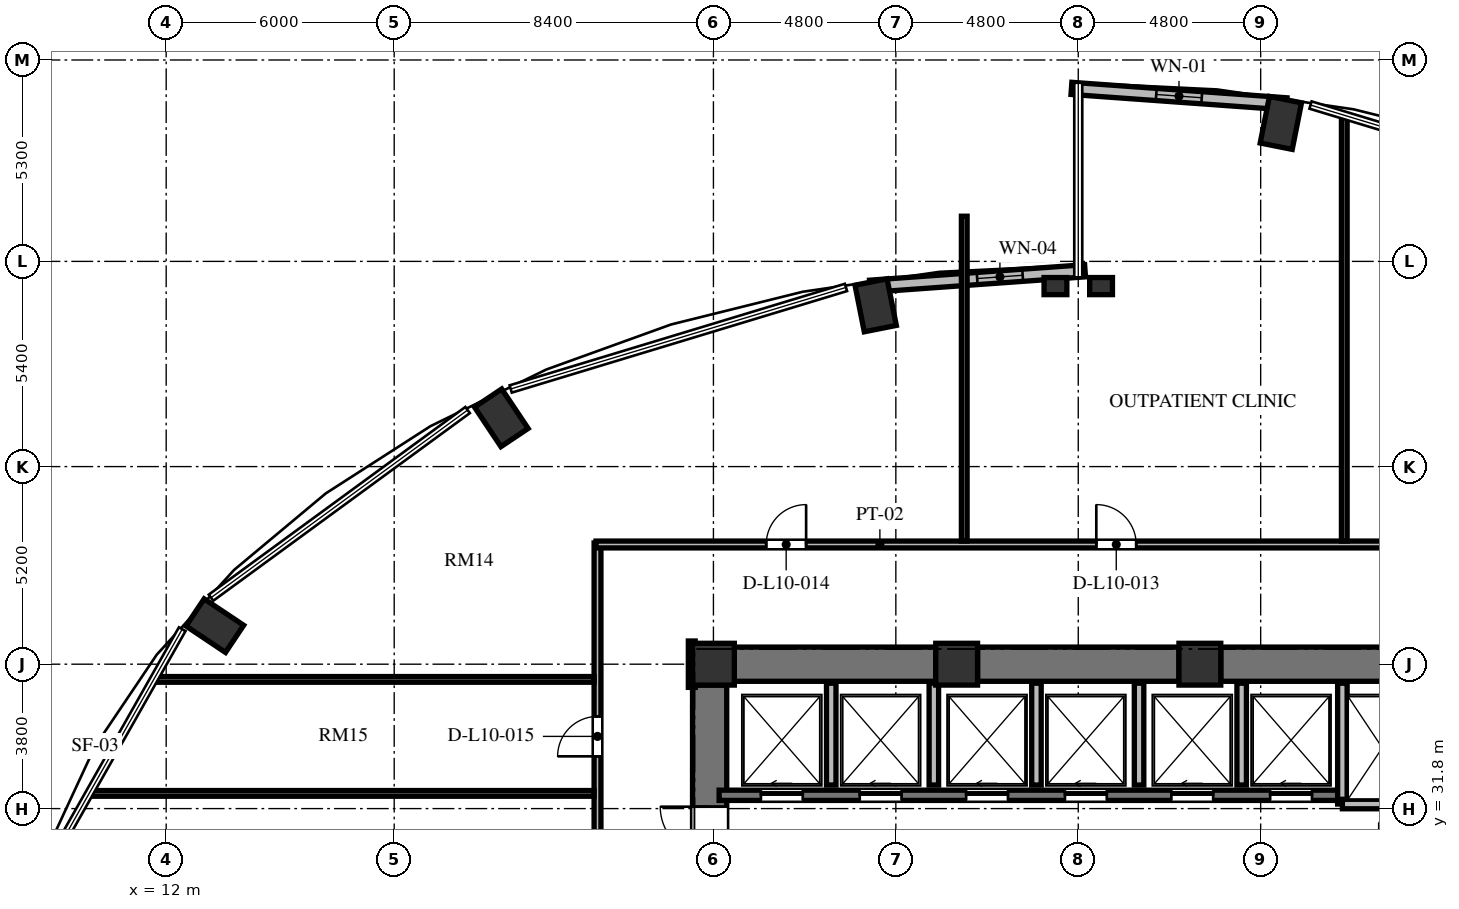
"""IFC4 building model, lengths in metres.
Left out: names, types, materials, properties, quantities, classifications, styles, units other than length and angle.
Written with IfcOpenShell. Run it as: python <this file> out.ifc"""

import sys

from ifc_helpers import new_model, si_unit, direction, frame, frame_2d, origin, origin_2d, place, context, subcontext, project, spatial, rectangle, extrude, element, fill, save


model = new_model("IFC4")
c1 = context("Model", 3, precision=1e-05, world=origin(), true_north=direction((0.0, 1.0)))
c2 = subcontext(c1, "Body", "Model", "MODEL_VIEW")
j1 = project(units=[si_unit("LENGTHUNIT", "METRE"), si_unit("PLANEANGLEUNIT", "RADIAN")], contexts=[c1])
p1 = place(None, origin())
s1 = spatial("IfcSite", under=j1, at=p1, CompositionType="ELEMENT")
p2 = place(p1, origin())
s2 = spatial("IfcBuilding", under=s1, at=p2, CompositionType="ELEMENT")
p3 = place(p2, frame((0.0, 0.0, 43.44)))
s3 = spatial("IfcBuildingStorey", under=s2, at=p3, CompositionType="ELEMENT", Elevation=43.44)
for number, where, z_axis, x_axis in (
    (1, (41.331, 49.844, 0.0), (0.0, 0.0, 1.0), (0.195, 0.981, 0.0)),
    (2, (30.669, 45.044, 0.0), (0.0, 0.0, 1.0), (-0.195, 0.981, 0.0)),
    (3, (20.819, 42.084, 0.0), (0.0, 0.0, 1.0), (-0.556, 0.831, 0.0)),
    (4, (13.28, 36.614, 0.0), (0.0, 0.0, 1.0), (-0.831, 0.556, 0.0)),
):
    element("IfcColumn", number, at=place(p3, frame(where, z_axis=z_axis, x_axis=x_axis)), inside=s3, PredefinedType="COLUMN", context=c2, shape_type="SweptSolid", body=[
        extrude(rectangle(XDim=1.25, YDim=0.86, at=origin_2d()), origin(), (0.0, 0.0, 1.0), 3.648),
    ])
for number, where, z_axis, x_axis in (
    (5, (39.2, 35.6, 0.0), (0.0, 0.0, 1.0), (1.0, 0.0, 0.0)),
    (6, (32.8, 35.6, 0.0), (0.0, 0.0, 1.0), (1.0, 0.0, 0.0)),
    (7, (26.4, 35.6, 0.0), (0.0, 0.0, 1.0), (1.0, 0.0, 0.0)),
):
    element("IfcColumn", number, at=place(p3, frame(where, z_axis=z_axis, x_axis=x_axis)), inside=s3, PredefinedType="COLUMN", context=c2, shape_type="SweptSolid", body=[
        extrude(rectangle(XDim=1.1, YDim=1.1, at=origin_2d()), origin(), (0.0, 0.0, 1.0), 3.648),
    ])
for number, where, z_axis, x_axis in (
    (8, (35.4, 45.55, 0.0), (0.0, 0.0, 1.0), (1.0, 0.0, 0.0)),
    (9, (36.6, 45.55, 0.0), (0.0, 0.0, 1.0), (1.0, 0.0, 0.0)),
):
    element("IfcColumn", number, at=place(p3, frame(where, z_axis=z_axis, x_axis=x_axis)), inside=s3, PredefinedType="PILASTER", context=c2, shape_type="SweptSolid", body=[
        extrude(rectangle(XDim=0.6, YDim=0.45, at=origin_2d()), origin(), (0.0, 0.0, 1.0), 3.648),
    ])
p4 = place(p3, frame((26.3, 20.95, 0.0), z_axis=(0.0, 0.0, 1.0), x_axis=(0.0, 1.0, 0.0)))
e10 = element("IfcWall", 10, at=p4, inside=s3, PredefinedType="SHEAR", context=c2, shape_type="SweptSolid", body=[
    extrude(rectangle(XDim=14.1, YDim=0.9, at=frame_2d((7.05, 0.0))), origin(), (0.0, 0.0, 1.0), 3.648),
])
p5 = place(p4, frame((6.5, 0.0, 0.0)))
e11 = element("IfcOpeningElement", 11, at=p5, cuts=e10, PredefinedType="OPENING", context=c2, shape_type="SweptSolid", body=[
    extrude(rectangle(XDim=1.2, YDim=2.15, at=frame_2d((0.6, 1.075))), frame((0.0, 0.46, 0.0), z_axis=(0.0, -1.0, 0.0), x_axis=(1.0, 0.0, 0.0)), (0.0, 0.0, 1.0), 0.92),
])
p6 = place(p4, frame((9.6, 0.0, 0.0)))
e12 = element("IfcOpeningElement", 12, at=p6, cuts=e10, PredefinedType="OPENING", context=c2, shape_type="SweptSolid", body=[
    extrude(rectangle(XDim=1.3, YDim=2.2, at=frame_2d((0.65, 1.1))), frame((0.0, 0.46, 0.0), z_axis=(0.0, -1.0, 0.0), x_axis=(1.0, 0.0, 0.0)), (0.0, 0.0, 1.0), 0.92),
])
p7 = place(p4, frame((3.26, 0.0, 0.0)))
e13 = element("IfcOpeningElement", 13, at=p7, cuts=e10, PredefinedType="OPENING", context=c2, shape_type="SweptSolid", body=[
    extrude(rectangle(XDim=1.3, YDim=2.2, at=frame_2d((0.65, 1.1))), frame((0.0, 0.46, 0.0), z_axis=(0.0, -1.0, 0.0), x_axis=(1.0, 0.0, 0.0)), (0.0, 0.0, 1.0), 0.92),
])
p8 = place(p3, frame((26.95, 35.6, 0.0), z_axis=(0.0, 0.0, 1.0), x_axis=(1.0, 0.0, 0.0)))
e14 = element("IfcWall", 14, at=p8, inside=s3, PredefinedType="SHEAR", context=c2, shape_type="SweptSolid", body=[
    extrude(rectangle(XDim=5.3, YDim=0.9, at=frame_2d((2.65, 0.0))), origin(), (0.0, 0.0, 1.0), 3.648),
])
p9 = place(p3, frame((33.35, 35.6, 0.0), z_axis=(0.0, 0.0, 1.0), x_axis=(1.0, 0.0, 0.0)))
e15 = element("IfcWall", 15, at=p9, inside=s3, PredefinedType="SHEAR", context=c2, shape_type="SweptSolid", body=[
    extrude(rectangle(XDim=5.3, YDim=0.9, at=frame_2d((2.65, 0.0))), origin(), (0.0, 0.0, 1.0), 3.648),
])
p10 = place(p3, frame((39.75, 35.6, 0.0), z_axis=(0.0, 0.0, 1.0), x_axis=(1.0, 0.0, 0.0)))
e16 = element("IfcWall", 16, at=p10, inside=s3, PredefinedType="SHEAR", context=c2, shape_type="SweptSolid", body=[
    extrude(rectangle(XDim=5.3, YDim=0.9, at=frame_2d((2.65, 0.0))), origin(), (0.0, 0.0, 1.0), 3.648),
])
p11 = place(p3, frame((41.481, 50.346, 0.0), z_axis=(0.0, 0.0, 1.0), x_axis=(-0.997422321809, 0.071754525696, 0.0)))
e17 = element("IfcWall", 17, at=p11, inside=s3, PredefinedType="SOLIDWALL", context=c2, shape_type="SweptSolid", body=[
    extrude(rectangle(XDim=5.675, YDim=0.32, at=frame_2d((2.838, 0.0))), origin(), (0.0, 0.0, 1.0), 3.428),
])
p12 = place(p11, frame((2.238, 0.0, 0.85)))
e18 = element("IfcOpeningElement", 18, at=p12, cuts=e17, PredefinedType="OPENING", context=c2, shape_type="SweptSolid", body=[
    extrude(rectangle(XDim=1.2, YDim=2.2, at=frame_2d((0.6, 1.1))), frame((0.0, 0.17, 0.0), z_axis=(0.0, -1.0, 0.0), x_axis=(1.0, 0.0, 0.0)), (0.0, 0.0, 1.0), 0.34),
])
p13 = place(p3, frame((36.179, 45.953, 0.0), z_axis=(0.0, 0.0, 1.0), x_axis=(-0.997421878774, -0.071760683825, 0.0)))
e19 = element("IfcWall", 19, at=p13, inside=s3, PredefinedType="SOLIDWALL", context=c2, shape_type="SweptSolid", body=[
    extrude(rectangle(XDim=5.675, YDim=0.32, at=frame_2d((2.837, 0.0))), origin(), (0.0, 0.0, 1.0), 3.428),
])
p14 = place(p13, frame((1.646, 0.0, 0.85)))
e20 = element("IfcOpeningElement", 20, at=p14, cuts=e19, PredefinedType="OPENING", context=c2, shape_type="SweptSolid", body=[
    extrude(rectangle(XDim=1.2, YDim=1.8, at=frame_2d((0.6, 0.9))), frame((0.0, 0.17, 0.0), z_axis=(0.0, -1.0, 0.0), x_axis=(1.0, 0.0, 0.0)), (0.0, 0.0, 1.0), 0.34),
])
p15 = place(p3, frame((26.55, 32.15, 0.0), z_axis=(0.0, 0.0, 1.0), x_axis=(1.0, 0.0, 0.0)))
e21 = element("IfcWall", 21, at=p15, inside=s3, PredefinedType="SHEAR", context=c2, shape_type="SweptSolid", body=[
    extrude(rectangle(XDim=16.4, YDim=0.27, at=frame_2d((8.2, 0.0))), origin(), (0.0, 0.0, 1.0), 3.648),
])
p16 = place(p15, frame((1.1, 0.0, 0.0)))
e22 = element("IfcOpeningElement", 22, at=p16, cuts=e21, PredefinedType="OPENING", context=c2, shape_type="SweptSolid", body=[
    extrude(rectangle(XDim=1.1, YDim=2.2, at=frame_2d((0.55, 1.1))), frame((0.0, 0.145, 0.0), z_axis=(0.0, -1.0, 0.0), x_axis=(1.0, 0.0, 0.0)), (0.0, 0.0, 1.0), 0.29),
])
p17 = place(p15, frame((3.7, 0.0, 0.0)))
e23 = element("IfcOpeningElement", 23, at=p17, cuts=e21, PredefinedType="OPENING", context=c2, shape_type="SweptSolid", body=[
    extrude(rectangle(XDim=1.1, YDim=2.2, at=frame_2d((0.55, 1.1))), frame((0.0, 0.145, 0.0), z_axis=(0.0, -1.0, 0.0), x_axis=(1.0, 0.0, 0.0)), (0.0, 0.0, 1.0), 0.29),
])
p18 = place(p15, frame((6.5, 0.0, 0.0)))
e24 = element("IfcOpeningElement", 24, at=p18, cuts=e21, PredefinedType="OPENING", context=c2, shape_type="SweptSolid", body=[
    extrude(rectangle(XDim=1.1, YDim=2.2, at=frame_2d((0.55, 1.1))), frame((0.0, 0.145, 0.0), z_axis=(0.0, -1.0, 0.0), x_axis=(1.0, 0.0, 0.0)), (0.0, 0.0, 1.0), 0.29),
])
p19 = place(p15, frame((9.1, 0.0, 0.0)))
e25 = element("IfcOpeningElement", 25, at=p19, cuts=e21, PredefinedType="OPENING", context=c2, shape_type="SweptSolid", body=[
    extrude(rectangle(XDim=1.1, YDim=2.2, at=frame_2d((0.55, 1.1))), frame((0.0, 0.145, 0.0), z_axis=(0.0, -1.0, 0.0), x_axis=(1.0, 0.0, 0.0)), (0.0, 0.0, 1.0), 0.29),
])
p20 = place(p15, frame((11.9, 0.0, 0.0)))
e26 = element("IfcOpeningElement", 26, at=p20, cuts=e21, PredefinedType="OPENING", context=c2, shape_type="SweptSolid", body=[
    extrude(rectangle(XDim=1.1, YDim=2.2, at=frame_2d((0.55, 1.1))), frame((0.0, 0.145, 0.0), z_axis=(0.0, -1.0, 0.0), x_axis=(1.0, 0.0, 0.0)), (0.0, 0.0, 1.0), 0.29),
])
p21 = place(p15, frame((14.5, 0.0, 0.0)))
e27 = element("IfcOpeningElement", 27, at=p21, cuts=e21, PredefinedType="OPENING", context=c2, shape_type="SweptSolid", body=[
    extrude(rectangle(XDim=1.1, YDim=2.2, at=frame_2d((0.55, 1.1))), frame((0.0, 0.145, 0.0), z_axis=(0.0, -1.0, 0.0), x_axis=(1.0, 0.0, 0.0)), (0.0, 0.0, 1.0), 0.29),
])
p22 = place(p3, frame((42.95, 31.92, 0.0), z_axis=(0.0, 0.0, 1.0), x_axis=(0.0, 1.0, 0.0)))
e28 = element("IfcWall", 28, at=p22, inside=s3, PredefinedType="SOLIDWALL", context=c2, shape_type="SweptSolid", body=[
    extrude(rectangle(XDim=3.18, YDim=0.25, at=frame_2d((1.59, 0.0))), origin(), (0.0, 0.0, 1.0), 3.428),
])
p23 = place(p3, frame((42.95, 31.92, 0.0), z_axis=(0.0, 0.0, 1.0), x_axis=(1.0, 0.0, 0.0)))
e29 = element("IfcWall", 29, at=p23, inside=s3, PredefinedType="SOLIDWALL", context=c2, shape_type="SweptSolid", body=[
    extrude(rectangle(XDim=2.3, YDim=0.25, at=frame_2d((1.15, 0.0))), origin(), (0.0, 0.0, 1.0), 3.428),
])
for number, where, z_axis, x_axis in (
    (30, (29.5, 32.42, 0.0), (0.0, 0.0, 1.0), (0.0, 1.0, 0.0)),
    (31, (32.2, 32.42, 0.0), (0.0, 0.0, 1.0), (0.0, 1.0, 0.0)),
    (32, (34.9, 32.42, 0.0), (0.0, 0.0, 1.0), (0.0, 1.0, 0.0)),
    (33, (37.6, 32.42, 0.0), (0.0, 0.0, 1.0), (0.0, 1.0, 0.0)),
    (34, (40.3, 32.42, 0.0), (0.0, 0.0, 1.0), (0.0, 1.0, 0.0)),
):
    element("IfcWall", number, at=place(p3, frame(where, z_axis=z_axis, x_axis=x_axis)), inside=s3, PredefinedType="SOLIDWALL", context=c2, shape_type="SweptSolid", body=[
        extrude(rectangle(XDim=2.68, YDim=0.25, at=frame_2d((1.34, 0.0))), origin(), (0.0, 0.0, 1.0), 3.428),
    ])
p24 = place(p3, frame((23.35, 29.36, 0.0), z_axis=(0.0, 0.0, 1.0), x_axis=(0.0, 1.0, 0.0)))
e35 = element("IfcWall", 35, at=p24, inside=s3, PredefinedType="PARTITIONING", context=c2, shape_type="SweptSolid", body=[
    extrude(rectangle(XDim=9.43, YDim=0.18, at=frame_2d((4.715, 0.0))), origin(), (0.0, 0.0, 1.0), 3.428),
])
p25 = place(p24, frame((3.815, 0.0, 0.0)))
e36 = element("IfcOpeningElement", 36, at=p25, cuts=e35, PredefinedType="OPENING", context=c2, shape_type="SweptSolid", body=[
    extrude(rectangle(XDim=1.05, YDim=2.15, at=frame_2d((0.525, 1.075))), frame((0.0, 0.1, 0.0), z_axis=(0.0, -1.0, 0.0), x_axis=(1.0, 0.0, 0.0)), (0.0, 0.0, 1.0), 0.2),
])
p26 = place(p3, frame((23.31, 38.75, 0.0), z_axis=(0.0, 0.0, 1.0), x_axis=(1.0, 0.0, 0.0)))
e37 = element("IfcWall", 37, at=p26, inside=s3, PredefinedType="PARTITIONING", context=c2, shape_type="SweptSolid", body=[
    extrude(rectangle(XDim=29.88, YDim=0.18, at=frame_2d((14.94, 0.0))), origin(), (0.0, 0.0, 1.0), 3.053),
])
p27 = place(p26, frame((24.101, 0.0, 0.0)))
e38 = element("IfcOpeningElement", 38, at=p27, cuts=e37, PredefinedType="OPENING", context=c2, shape_type="SweptSolid", body=[
    extrude(rectangle(XDim=1.05, YDim=2.15, at=frame_2d((0.525, 1.075))), frame((0.0, 0.1, 0.0), z_axis=(0.0, -1.0, 0.0), x_axis=(1.0, 0.0, 0.0)), (0.0, 0.0, 1.0), 0.2),
])
p28 = place(p26, frame((13.165, 0.0, 0.0)))
e39 = element("IfcOpeningElement", 39, at=p28, cuts=e37, PredefinedType="OPENING", context=c2, shape_type="SweptSolid", body=[
    extrude(rectangle(XDim=1.05, YDim=2.15, at=frame_2d((0.525, 1.075))), frame((0.0, 0.1, 0.0), z_axis=(0.0, -1.0, 0.0), x_axis=(1.0, 0.0, 0.0)), (0.0, 0.0, 1.0), 0.2),
])
p29 = place(p26, frame((4.479, 0.0, 0.0)))
e40 = element("IfcOpeningElement", 40, at=p29, cuts=e37, PredefinedType="OPENING", context=c2, shape_type="SweptSolid", body=[
    extrude(rectangle(XDim=1.05, YDim=2.15, at=frame_2d((0.525, 1.075))), frame((0.0, 0.1, 0.0), z_axis=(0.0, -1.0, 0.0), x_axis=(1.0, 0.0, 0.0)), (0.0, 0.0, 1.0), 0.2),
])
p30 = place(p3, frame((25.83, 36.21, 0.0), z_axis=(0.0, 0.0, 1.0), x_axis=(0.0, -1.0, 0.0)))
e41 = element("IfcWall", 41, at=p30, inside=s3, PredefinedType="PARTITIONING", context=c2, shape_type="SweptSolid", body=[
    extrude(rectangle(XDim=1.22, YDim=0.18, at=frame_2d((0.61, 0.0))), origin(), (0.0, 0.0, 1.0), 3.428),
])
p31 = place(p3, frame((9.978, 32.2, 0.0), z_axis=(0.0, 0.0, 1.0), x_axis=(1.0, 0.0, 0.0)))
e42 = element("IfcWall", 42, at=p31, inside=s3, PredefinedType="PARTITIONING", context=c2, shape_type="SweptSolid", body=[
    extrude(rectangle(XDim=13.282, YDim=0.15, at=frame_2d((6.641, 0.0))), origin(), (0.0, 0.0, 1.0), 3.428),
])
p32 = place(p3, frame((11.677, 35.2, 0.0), z_axis=(0.0, 0.0, 1.0), x_axis=(1.0, 0.0, 0.0)))
e43 = element("IfcWall", 43, at=p32, inside=s3, PredefinedType="PARTITIONING", context=c2, shape_type="SweptSolid", body=[
    extrude(rectangle(XDim=11.583, YDim=0.15, at=frame_2d((5.791, 0.0))), origin(), (0.0, 0.0, 1.0), 3.428),
])
p33 = place(p3, frame((33.0, 38.84, 0.0), z_axis=(0.0, 0.0, 1.0), x_axis=(0.0, 1.0, 0.0)))
e44 = element("IfcWall", 44, at=p33, inside=s3, PredefinedType="PARTITIONING", context=c2, shape_type="SweptSolid", body=[
    extrude(rectangle(XDim=8.549, YDim=0.15, at=frame_2d((4.274, 0.0))), origin(), (0.0, 0.0, 1.0), 3.428),
])
p34 = place(p3, frame((43.0, 38.84, 0.0), z_axis=(0.0, 0.0, 1.0), x_axis=(0.0, 1.0, 0.0)))
e45 = element("IfcWall", 45, at=p34, inside=s3, PredefinedType="PARTITIONING", context=c2, shape_type="SweptSolid", body=[
    extrude(rectangle(XDim=11.193, YDim=0.15, at=frame_2d((5.597, 0.0))), origin(), (0.0, 0.0, 1.0), 3.428),
])
p35 = place(p12, origin())
e46 = element("IfcWindow", 46, at=p35, inside=s3, PartitioningType="SINGLE_PANEL", PredefinedType="WINDOW", context=c2, shape_type="SweptSolid", body=[
    extrude(rectangle(XDim=1.2, YDim=2.2, at=frame_2d((0.6, 1.1))), frame((0.0, 0.03, 0.0), z_axis=(0.0, -1.0, 0.0), x_axis=(1.0, 0.0, 0.0)), (0.0, 0.0, 1.0), 0.06),
])
fill(e18, e46)
p36 = place(p14, origin())
e47 = element("IfcWindow", 47, at=p36, inside=s3, PartitioningType="SINGLE_PANEL", PredefinedType="WINDOW", context=c2, shape_type="SweptSolid", body=[
    extrude(rectangle(XDim=1.2, YDim=1.8, at=frame_2d((0.6, 0.9))), frame((0.0, 0.03, 0.0), z_axis=(0.0, -1.0, 0.0), x_axis=(1.0, 0.0, 0.0)), (0.0, 0.0, 1.0), 0.06),
])
fill(e20, e47)
p37 = place(p6, origin())
e48 = element("IfcDoor", 48, at=p37, inside=s3, OperationType="SINGLE_SWING_RIGHT", PredefinedType="DOOR", context=c2, shape_type="SweptSolid", body=[
    extrude(rectangle(XDim=1.3, YDim=2.2, at=frame_2d((0.65, 1.1))), frame((0.0, 0.025, 0.0), z_axis=(0.0, -1.0, 0.0), x_axis=(1.0, 0.0, 0.0)), (0.0, 0.0, 1.0), 0.05),
])
fill(e12, e48)
p38 = place(p16, origin())
e49 = element("IfcDoor", 49, at=p38, inside=s3, OperationType="SLIDING_TO_LEFT", PredefinedType="DOOR", context=c2, shape_type="SweptSolid", body=[
    extrude(rectangle(XDim=1.1, YDim=2.2, at=frame_2d((0.55, 1.1))), frame((0.0, 0.025, 0.0), z_axis=(0.0, -1.0, 0.0), x_axis=(1.0, 0.0, 0.0)), (0.0, 0.0, 1.0), 0.05),
])
fill(e22, e49)
p39 = place(p17, origin())
e50 = element("IfcDoor", 50, at=p39, inside=s3, OperationType="SLIDING_TO_LEFT", PredefinedType="DOOR", context=c2, shape_type="SweptSolid", body=[
    extrude(rectangle(XDim=1.1, YDim=2.2, at=frame_2d((0.55, 1.1))), frame((0.0, 0.025, 0.0), z_axis=(0.0, -1.0, 0.0), x_axis=(1.0, 0.0, 0.0)), (0.0, 0.0, 1.0), 0.05),
])
fill(e23, e50)
p40 = place(p18, origin())
e51 = element("IfcDoor", 51, at=p40, inside=s3, OperationType="SLIDING_TO_LEFT", PredefinedType="DOOR", context=c2, shape_type="SweptSolid", body=[
    extrude(rectangle(XDim=1.1, YDim=2.2, at=frame_2d((0.55, 1.1))), frame((0.0, 0.025, 0.0), z_axis=(0.0, -1.0, 0.0), x_axis=(1.0, 0.0, 0.0)), (0.0, 0.0, 1.0), 0.05),
])
fill(e24, e51)
p41 = place(p19, origin())
e52 = element("IfcDoor", 52, at=p41, inside=s3, OperationType="SLIDING_TO_LEFT", PredefinedType="DOOR", context=c2, shape_type="SweptSolid", body=[
    extrude(rectangle(XDim=1.1, YDim=2.2, at=frame_2d((0.55, 1.1))), frame((0.0, 0.025, 0.0), z_axis=(0.0, -1.0, 0.0), x_axis=(1.0, 0.0, 0.0)), (0.0, 0.0, 1.0), 0.05),
])
fill(e25, e52)
p42 = place(p20, origin())
e53 = element("IfcDoor", 53, at=p42, inside=s3, OperationType="SLIDING_TO_LEFT", PredefinedType="DOOR", context=c2, shape_type="SweptSolid", body=[
    extrude(rectangle(XDim=1.1, YDim=2.2, at=frame_2d((0.55, 1.1))), frame((0.0, 0.025, 0.0), z_axis=(0.0, -1.0, 0.0), x_axis=(1.0, 0.0, 0.0)), (0.0, 0.0, 1.0), 0.05),
])
fill(e26, e53)
p43 = place(p21, origin())
e54 = element("IfcDoor", 54, at=p43, inside=s3, OperationType="SLIDING_TO_LEFT", PredefinedType="DOOR", context=c2, shape_type="SweptSolid", body=[
    extrude(rectangle(XDim=1.1, YDim=2.2, at=frame_2d((0.55, 1.1))), frame((0.0, 0.025, 0.0), z_axis=(0.0, -1.0, 0.0), x_axis=(1.0, 0.0, 0.0)), (0.0, 0.0, 1.0), 0.05),
])
fill(e27, e54)
p44 = place(p28, origin())
e55 = element("IfcDoor", 55, at=p44, inside=s3, OperationType="SINGLE_SWING_LEFT", PredefinedType="DOOR", context=c2, shape_type="SweptSolid", body=[
    extrude(rectangle(XDim=1.05, YDim=2.15, at=frame_2d((0.525, 1.075))), frame((0.0, 0.025, 0.0), z_axis=(0.0, -1.0, 0.0), x_axis=(1.0, 0.0, 0.0)), (0.0, 0.0, 1.0), 0.05),
])
fill(e39, e55)
p45 = place(p29, origin())
e56 = element("IfcDoor", 56, at=p45, inside=s3, OperationType="SINGLE_SWING_RIGHT", PredefinedType="DOOR", context=c2, shape_type="SweptSolid", body=[
    extrude(rectangle(XDim=1.05, YDim=2.15, at=frame_2d((0.525, 1.075))), frame((0.0, 0.025, 0.0), z_axis=(0.0, -1.0, 0.0), x_axis=(1.0, 0.0, 0.0)), (0.0, 0.0, 1.0), 0.05),
])
fill(e40, e56)
p46 = place(p25, origin())
e57 = element("IfcDoor", 57, at=p46, inside=s3, OperationType="SINGLE_SWING_LEFT", PredefinedType="DOOR", context=c2, shape_type="SweptSolid", body=[
    extrude(rectangle(XDim=1.05, YDim=2.15, at=frame_2d((0.525, 1.075))), frame((0.0, 0.025, 0.0), z_axis=(0.0, -1.0, 0.0), x_axis=(1.0, 0.0, 0.0)), (0.0, 0.0, 1.0), 0.05),
])
fill(e36, e57)
save(model, sys.argv[1])
